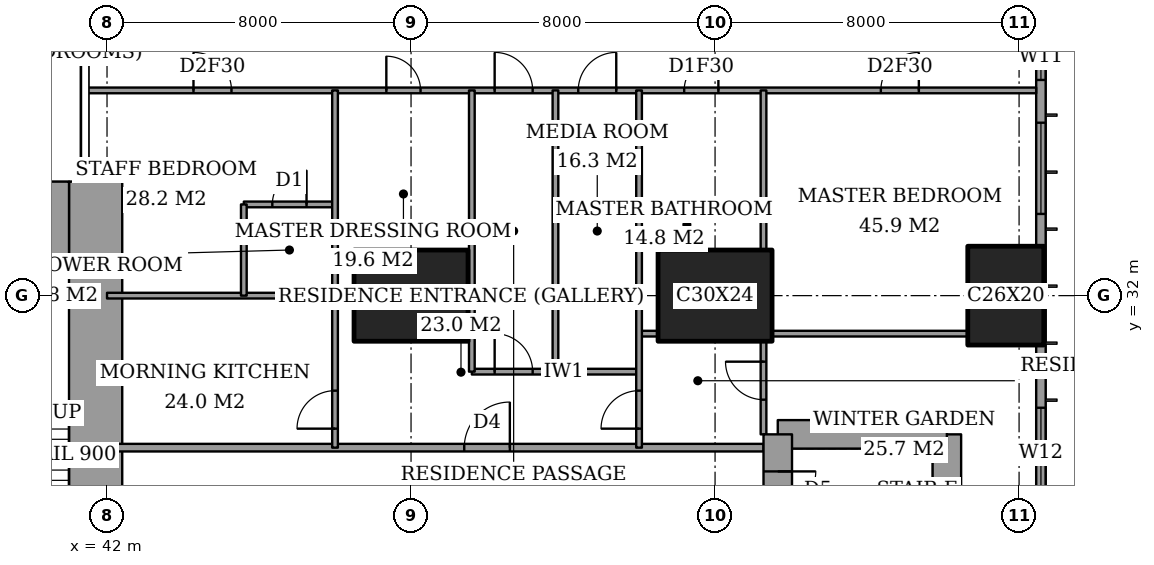
"""IFC4 building model, lengths in metres.
Left out: names, types, materials, properties, quantities, classifications, styles, units other than length and angle.
Written with IfcOpenShell. Run it as: python <this file> out.ifc"""

import sys

from ifc_helpers import new_model, si_unit, direction, frame, frame_2d, origin, origin_2d, place, context, subcontext, project, spatial, rectangle, extrude, element, fill, save


model = new_model("IFC4")
c1 = context("Model", 3, precision=1e-05, world=origin(), true_north=direction((0.0, 1.0)))
c2 = subcontext(c1, "Body", "Model", "MODEL_VIEW")
j1 = project(units=[si_unit("LENGTHUNIT", "METRE"), si_unit("PLANEANGLEUNIT", "RADIAN")], contexts=[c1])
p1 = place(None, origin())
s1 = spatial("IfcSite", under=j1, at=p1, CompositionType="ELEMENT")
p2 = place(p1, origin())
s2 = spatial("IfcBuilding", under=s1, at=p2, CompositionType="ELEMENT")
p3 = place(p2, frame((0.0, 0.0, 157.4)))
s3 = spatial("IfcBuildingStorey", under=s2, at=p3, CompositionType="ELEMENT", Elevation=157.4)
for number, where, z_axis, x_axis in (
    (1, (50.0, 32.0, 0.0), (0.0, 0.0, 1.0), (1.0, 0.0, 0.0)),
    (2, (58.0, 32.0, 0.0), (0.0, 0.0, 1.0), (1.0, 0.0, 0.0)),
):
    element("IfcColumn", number, at=place(p3, frame(where, z_axis=z_axis, x_axis=x_axis)), inside=s3, PredefinedType="COLUMN", context=c2, shape_type="SweptSolid", body=[
        extrude(rectangle(XDim=3.0, YDim=2.4, at=origin_2d()), origin(), (0.0, 0.0, 1.0), 3.6),
    ])
p4 = place(p3, frame((65.65, 32.0, 0.0), z_axis=(0.0, 0.0, 1.0), x_axis=(0.0, 1.0, 0.0)))
e3 = element("IfcColumn", 3, at=p4, inside=s3, PredefinedType="COLUMN", context=c2, shape_type="SweptSolid", body=[
    extrude(rectangle(XDim=2.6, YDim=2.0, at=origin_2d()), origin(), (0.0, 0.0, 1.0), 3.6),
])
p5 = place(p3, frame((37.85, 34.0, 0.0), z_axis=(0.0, 0.0, 1.0), x_axis=(1.0, 0.0, 0.0)))
e4 = element("IfcWall", 4, at=p5, inside=s3, PredefinedType="SHEAR", context=c2, shape_type="SweptSolid", body=[
    extrude(rectangle(XDim=3.15, YDim=2.0, at=frame_2d((1.575, 0.0))), origin(), (0.0, 0.0, 1.0), 3.6),
])
p6 = place(p3, frame((41.7, 24.85, 0.0), z_axis=(0.0, 0.0, 1.0), x_axis=(0.0, 1.0, 0.0)))
e5 = element("IfcWall", 5, at=p6, inside=s3, PredefinedType="SHEAR", context=c2, shape_type="SweptSolid", body=[
    extrude(rectangle(XDim=10.15, YDim=1.4, at=frame_2d((5.075, 0.0))), origin(), (0.0, 0.0, 1.0), 3.6),
])
p7 = place(p3, frame((64.1, 19.65, 0.0), z_axis=(0.0, 0.0, 1.0), x_axis=(0.0, 1.0, 0.0)))
e6 = element("IfcWall", 6, at=p7, inside=s3, PredefinedType="SHEAR", context=c2, shape_type="SweptSolid", body=[
    extrude(rectangle(XDim=8.7, YDim=0.75, at=frame_2d((4.35, 0.0))), origin(), (0.0, 0.0, 1.0), 3.6),
])
p8 = place(p3, frame((64.1, 28.35, 0.0), z_axis=(0.0, 0.0, 1.0), x_axis=(-1.0, 0.0, 0.0)))
e7 = element("IfcWall", 7, at=p8, inside=s3, PredefinedType="SHEAR", context=c2, shape_type="SweptSolid", body=[
    extrude(rectangle(XDim=4.45, YDim=0.75, at=frame_2d((2.225, 0.0))), origin(), (0.0, 0.0, 1.0), 3.6),
])
p9 = place(p3, frame((59.65, 28.35, 0.0), z_axis=(0.0, 0.0, 1.0), x_axis=(0.0, -1.0, 0.0)))
e8 = element("IfcWall", 8, at=p9, inside=s3, PredefinedType="SHEAR", context=c2, shape_type="SweptSolid", body=[
    extrude(rectangle(XDim=8.7, YDim=0.75, at=frame_2d((4.35, 0.0))), origin(), (0.0, 0.0, 1.0), 3.6),
])
p10 = place(p9, frame((0.975, 0.0, 0.0)))
e9 = element("IfcOpeningElement", 9, at=p10, cuts=e8, PredefinedType="OPENING", context=c2, shape_type="SweptSolid", body=[
    extrude(rectangle(XDim=1.0, YDim=2.1, at=frame_2d((0.5, 1.05))), frame((0.0, 0.385, 0.0), z_axis=(0.0, -1.0, 0.0), x_axis=(1.0, 0.0, 0.0)), (0.0, 0.0, 1.0), 0.77),
])
p11 = place(p3, frame((66.575, 3.175, 0.0), z_axis=(0.0, 0.0, 1.0), x_axis=(0.0, 1.0, 0.0)))
e10 = element("IfcWall", 10, at=p11, inside=s3, PredefinedType="SOLIDWALL", context=c2, shape_type="SweptSolid", body=[
    extrude(rectangle(XDim=41.65, YDim=0.25, at=frame_2d((20.825, 0.0))), origin(), (0.0, 0.0, 1.0), 3.6),
])
p12 = place(p11, frame((0.775, 0.0, 0.4)))
e11 = element("IfcOpeningElement", 11, at=p12, cuts=e10, PredefinedType="OPENING", context=c2, shape_type="SweptSolid", body=[
    extrude(rectangle(XDim=2.4, YDim=2.2, at=frame_2d((1.2, 1.1))), frame((0.0, 0.135, 0.0), z_axis=(0.0, -1.0, 0.0), x_axis=(1.0, 0.0, 0.0)), (0.0, 0.0, 1.0), 0.27),
])
p13 = place(p11, frame((6.225, 0.0, 0.4)))
e12 = element("IfcOpeningElement", 12, at=p13, cuts=e10, PredefinedType="OPENING", context=c2, shape_type="SweptSolid", body=[
    extrude(rectangle(XDim=1.2, YDim=2.2, at=frame_2d((0.6, 1.1))), frame((0.0, 0.135, 0.0), z_axis=(0.0, -1.0, 0.0), x_axis=(1.0, 0.0, 0.0)), (0.0, 0.0, 1.0), 0.27),
])
p14 = place(p11, frame((8.475, 0.0, 0.4)))
e13 = element("IfcOpeningElement", 13, at=p14, cuts=e10, PredefinedType="OPENING", context=c2, shape_type="SweptSolid", body=[
    extrude(rectangle(XDim=2.4, YDim=2.2, at=frame_2d((1.2, 1.1))), frame((0.0, 0.135, 0.0), z_axis=(0.0, -1.0, 0.0), x_axis=(1.0, 0.0, 0.0)), (0.0, 0.0, 1.0), 0.27),
])
p15 = place(p11, frame((15.775, 0.0, 0.4)))
e14 = element("IfcOpeningElement", 14, at=p15, cuts=e10, PredefinedType="OPENING", context=c2, shape_type="SweptSolid", body=[
    extrude(rectangle(XDim=2.4, YDim=2.2, at=frame_2d((1.2, 1.1))), frame((0.0, 0.135, 0.0), z_axis=(0.0, -1.0, 0.0), x_axis=(1.0, 0.0, 0.0)), (0.0, 0.0, 1.0), 0.27),
])
p16 = place(p11, frame((23.475, 0.0, 0.4)))
e15 = element("IfcOpeningElement", 15, at=p16, cuts=e10, PredefinedType="OPENING", context=c2, shape_type="SweptSolid", body=[
    extrude(rectangle(XDim=2.4, YDim=2.2, at=frame_2d((1.2, 1.1))), frame((0.0, 0.135, 0.0), z_axis=(0.0, -1.0, 0.0), x_axis=(1.0, 0.0, 0.0)), (0.0, 0.0, 1.0), 0.27),
])
p17 = place(p11, frame((30.975, 0.0, 0.4)))
e16 = element("IfcOpeningElement", 16, at=p17, cuts=e10, PredefinedType="OPENING", context=c2, shape_type="SweptSolid", body=[
    extrude(rectangle(XDim=2.4, YDim=2.2, at=frame_2d((1.2, 1.1))), frame((0.0, 0.135, 0.0), z_axis=(0.0, -1.0, 0.0), x_axis=(1.0, 0.0, 0.0)), (0.0, 0.0, 1.0), 0.27),
])
p18 = place(p11, frame((34.5, 0.0, 0.4)))
e17 = element("IfcOpeningElement", 17, at=p18, cuts=e10, PredefinedType="OPENING", context=c2, shape_type="SweptSolid", body=[
    extrude(rectangle(XDim=1.2, YDim=2.2, at=frame_2d((0.6, 1.1))), frame((0.0, 0.135, 0.0), z_axis=(0.0, -1.0, 0.0), x_axis=(1.0, 0.0, 0.0)), (0.0, 0.0, 1.0), 0.27),
])
p19 = place(p11, frame((38.475, 0.0, 0.4)))
e18 = element("IfcOpeningElement", 18, at=p19, cuts=e10, PredefinedType="OPENING", context=c2, shape_type="SweptSolid", body=[
    extrude(rectangle(XDim=2.4, YDim=2.2, at=frame_2d((1.2, 1.1))), frame((0.0, 0.135, 0.0), z_axis=(0.0, -1.0, 0.0), x_axis=(1.0, 0.0, 0.0)), (0.0, 0.0, 1.0), 0.27),
])
p20 = place(p3, frame((42.0, 28.0, 0.0), z_axis=(0.0, 0.0, 1.0), x_axis=(1.0, 0.0, 0.0)))
e19 = element("IfcWall", 19, at=p20, inside=s3, PredefinedType="PARTITIONING", context=c2, shape_type="SweptSolid", body=[
    extrude(rectangle(XDim=17.275, YDim=0.2, at=frame_2d((8.637, 0.0))), origin(), (0.0, 0.0, 1.0), 3.35),
])
p21 = place(p20, frame((9.4, 0.0, 0.0)))
e20 = element("IfcOpeningElement", 20, at=p21, cuts=e19, PredefinedType="OPENING", context=c2, shape_type="SweptSolid", body=[
    extrude(rectangle(XDim=1.2, YDim=2.4, at=frame_2d((0.6, 1.2))), frame((0.0, 0.11, 0.0), z_axis=(0.0, -1.0, 0.0), x_axis=(1.0, 0.0, 0.0)), (0.0, 0.0, 1.0), 0.22),
])
p22 = place(p3, frame((51.6, 30.0, 0.0), z_axis=(0.0, 0.0, 1.0), x_axis=(1.0, 0.0, 0.0)))
e21 = element("IfcWall", 21, at=p22, inside=s3, PredefinedType="PARTITIONING", context=c2, shape_type="SweptSolid", body=[
    extrude(rectangle(XDim=4.4, YDim=0.15, at=frame_2d((2.2, 0.0))), origin(), (0.0, 0.0, 1.0), 3.35),
])
p23 = place(p22, frame((0.6, 0.0, 0.0)))
e22 = element("IfcOpeningElement", 22, at=p23, cuts=e21, PredefinedType="OPENING", context=c2, shape_type="SweptSolid", body=[
    extrude(rectangle(XDim=1.0, YDim=2.1, at=frame_2d((0.5, 1.05))), frame((0.0, 0.085, 0.0), z_axis=(0.0, -1.0, 0.0), x_axis=(1.0, 0.0, 0.0)), (0.0, 0.0, 1.0), 0.17),
])
p24 = place(p3, frame((56.0, 31.0, 0.0), z_axis=(0.0, 0.0, 1.0), x_axis=(1.0, 0.0, 0.0)))
e23 = element("IfcWall", 23, at=p24, inside=s3, PredefinedType="PARTITIONING", context=c2, shape_type="SweptSolid", body=[
    extrude(rectangle(XDim=0.5, YDim=0.15, at=frame_2d((0.25, 0.0))), origin(), (0.0, 0.0, 1.0), 3.35),
])
p25 = place(p3, frame((59.5, 31.0, 0.0), z_axis=(0.0, 0.0, 1.0), x_axis=(1.0, 0.0, 0.0)))
e24 = element("IfcWall", 24, at=p25, inside=s3, PredefinedType="PARTITIONING", context=c2, shape_type="SweptSolid", body=[
    extrude(rectangle(XDim=5.15, YDim=0.15, at=frame_2d((2.575, 0.0))), origin(), (0.0, 0.0, 1.0), 3.35),
])
p26 = place(p3, frame((48.0, 31.95, 0.0), z_axis=(0.0, 0.0, 1.0), x_axis=(1.0, 0.0, 0.0)))
e25 = element("IfcWall", 25, at=p26, inside=s3, PredefinedType="PARTITIONING", context=c2, shape_type="SweptSolid", body=[
    extrude(rectangle(XDim=0.5, YDim=0.15, at=frame_2d((0.25, 0.0))), origin(), (0.0, 0.0, 1.0), 2.634),
])
p27 = place(p3, frame((42.0, 32.0, 0.0), z_axis=(0.0, 0.0, 1.0), x_axis=(1.0, 0.0, 0.0)))
e26 = element("IfcWall", 26, at=p27, inside=s3, PredefinedType="PARTITIONING", context=c2, shape_type="SweptSolid", body=[
    extrude(rectangle(XDim=6.0, YDim=0.15, at=frame_2d((3.0, 0.0))), origin(), (0.0, 0.0, 1.0), 2.634),
])
p28 = place(p3, frame((45.6, 34.4, 0.0), z_axis=(0.0, 0.0, 1.0), x_axis=(1.0, 0.0, 0.0)))
e27 = element("IfcWall", 27, at=p28, inside=s3, PredefinedType="PARTITIONING", context=c2, shape_type="SweptSolid", body=[
    extrude(rectangle(XDim=2.4, YDim=0.15, at=frame_2d((1.2, 0.0))), origin(), (0.0, 0.0, 1.0), 3.35),
])
p29 = place(p28, frame((0.75, 0.0, 0.0)))
e28 = element("IfcOpeningElement", 28, at=p29, cuts=e27, PredefinedType="OPENING", context=c2, shape_type="SweptSolid", body=[
    extrude(rectangle(XDim=0.9, YDim=2.1, at=frame_2d((0.45, 1.05))), frame((0.0, 0.085, 0.0), z_axis=(0.0, -1.0, 0.0), x_axis=(1.0, 0.0, 0.0)), (0.0, 0.0, 1.0), 0.17),
])
p30 = place(p3, frame((41.439, 37.4, 0.0), z_axis=(0.0, 0.0, 1.0), x_axis=(1.0, 0.0, 0.0)))
e29 = element("IfcWall", 29, at=p30, inside=s3, PredefinedType="PARTITIONING", context=c2, shape_type="SweptSolid", body=[
    extrude(rectangle(XDim=25.011, YDim=0.15, at=frame_2d((12.505, 0.0))), origin(), (0.0, 0.0, 1.0), 3.35),
])
p31 = place(p30, frame((10.761, 0.0, 0.0)))
e30 = element("IfcOpeningElement", 30, at=p31, cuts=e29, PredefinedType="OPENING", context=c2, shape_type="SweptSolid", body=[
    extrude(rectangle(XDim=1.0, YDim=2.1, at=frame_2d((0.5, 1.05))), frame((0.0, 0.085, 0.0), z_axis=(0.0, -1.0, 0.0), x_axis=(1.0, 0.0, 0.0)), (0.0, 0.0, 1.0), 0.17),
])
p32 = place(p30, frame((20.924, 0.0, 0.0)))
e31 = element("IfcOpeningElement", 31, at=p32, cuts=e29, PredefinedType="OPENING", context=c2, shape_type="SweptSolid", body=[
    extrude(rectangle(XDim=1.0, YDim=2.1, at=frame_2d((0.5, 1.05))), frame((0.0, 0.085, 0.0), z_axis=(0.0, -1.0, 0.0), x_axis=(1.0, 0.0, 0.0)), (0.0, 0.0, 1.0), 0.17),
])
p33 = place(p30, frame((15.749, 0.0, 0.0)))
e32 = element("IfcOpeningElement", 32, at=p33, cuts=e29, PredefinedType="OPENING", context=c2, shape_type="SweptSolid", body=[
    extrude(rectangle(XDim=0.9, YDim=2.1, at=frame_2d((0.45, 1.05))), frame((0.0, 0.085, 0.0), z_axis=(0.0, -1.0, 0.0), x_axis=(1.0, 0.0, 0.0)), (0.0, 0.0, 1.0), 0.17),
])
p34 = place(p30, frame((12.961, 0.0, 0.0)))
e33 = element("IfcOpeningElement", 33, at=p34, cuts=e29, PredefinedType="OPENING", context=c2, shape_type="SweptSolid", body=[
    extrude(rectangle(XDim=1.0, YDim=2.1, at=frame_2d((0.5, 1.05))), frame((0.0, 0.085, 0.0), z_axis=(0.0, -1.0, 0.0), x_axis=(1.0, 0.0, 0.0)), (0.0, 0.0, 1.0), 0.17),
])
p35 = place(p30, frame((7.911, 0.0, 0.0)))
e34 = element("IfcOpeningElement", 34, at=p35, cuts=e29, PredefinedType="OPENING", context=c2, shape_type="SweptSolid", body=[
    extrude(rectangle(XDim=0.9, YDim=2.1, at=frame_2d((0.45, 1.05))), frame((0.0, 0.085, 0.0), z_axis=(0.0, -1.0, 0.0), x_axis=(1.0, 0.0, 0.0)), (0.0, 0.0, 1.0), 0.17),
])
p36 = place(p30, frame((2.836, 0.0, 0.0)))
e35 = element("IfcOpeningElement", 35, at=p36, cuts=e29, PredefinedType="OPENING", context=c2, shape_type="SweptSolid", body=[
    extrude(rectangle(XDim=1.0, YDim=2.1, at=frame_2d((0.5, 1.05))), frame((0.0, 0.085, 0.0), z_axis=(0.0, -1.0, 0.0), x_axis=(1.0, 0.0, 0.0)), (0.0, 0.0, 1.0), 0.17),
])
p37 = place(p3, frame((45.6, 32.0, 0.0), z_axis=(0.0, 0.0, 1.0), x_axis=(0.0, 1.0, 0.0)))
e36 = element("IfcWall", 36, at=p37, inside=s3, PredefinedType="PARTITIONING", context=c2, shape_type="SweptSolid", body=[
    extrude(rectangle(XDim=2.4, YDim=0.15, at=frame_2d((1.2, 0.0))), origin(), (0.0, 0.0, 1.0), 3.35),
])
p38 = place(p3, frame((48.0, 28.0, 0.0), z_axis=(0.0, 0.0, 1.0), x_axis=(0.0, 1.0, 0.0)))
e37 = element("IfcWall", 37, at=p38, inside=s3, PredefinedType="PARTITIONING", context=c2, shape_type="SweptSolid", body=[
    extrude(rectangle(XDim=9.4, YDim=0.15, at=frame_2d((4.7, 0.0))), origin(), (0.0, 0.0, 1.0), 3.35),
])
p39 = place(p38, frame((0.5, 0.0, 0.0)))
e38 = element("IfcOpeningElement", 38, at=p39, cuts=e37, PredefinedType="OPENING", context=c2, shape_type="SweptSolid", body=[
    extrude(rectangle(XDim=1.0, YDim=2.1, at=frame_2d((0.5, 1.05))), frame((0.0, 0.085, 0.0), z_axis=(0.0, -1.0, 0.0), x_axis=(1.0, 0.0, 0.0)), (0.0, 0.0, 1.0), 0.17),
])
for number, where, z_axis, x_axis in (
    (39, (51.6, 30.0, 0.0), (0.0, 0.0, 1.0), (0.0, 1.0, 0.0)),
    (40, (53.8, 30.0, 0.0), (0.0, 0.0, 1.0), (0.0, 1.0, 0.0)),
):
    element("IfcWall", number, at=place(p3, frame(where, z_axis=z_axis, x_axis=x_axis)), inside=s3, PredefinedType="PARTITIONING", context=c2, shape_type="SweptSolid", body=[
        extrude(rectangle(XDim=7.4, YDim=0.15, at=frame_2d((3.7, 0.0))), origin(), (0.0, 0.0, 1.0), 3.35),
    ])
p40 = place(p3, frame((56.0, 28.0, 0.0), z_axis=(0.0, 0.0, 1.0), x_axis=(0.0, 1.0, 0.0)))
e41 = element("IfcWall", 41, at=p40, inside=s3, PredefinedType="PARTITIONING", context=c2, shape_type="SweptSolid", body=[
    extrude(rectangle(XDim=9.4, YDim=0.15, at=frame_2d((4.7, 0.0))), origin(), (0.0, 0.0, 1.0), 3.35),
])
p41 = place(p40, frame((0.5, 0.0, 0.0)))
e42 = element("IfcOpeningElement", 42, at=p41, cuts=e41, PredefinedType="OPENING", context=c2, shape_type="SweptSolid", body=[
    extrude(rectangle(XDim=1.0, YDim=2.1, at=frame_2d((0.5, 1.05))), frame((0.0, 0.085, 0.0), z_axis=(0.0, -1.0, 0.0), x_axis=(1.0, 0.0, 0.0)), (0.0, 0.0, 1.0), 0.17),
])
p42 = place(p3, frame((59.275, 28.35, 0.0), z_axis=(0.0, 0.0, 1.0), x_axis=(0.0, 1.0, 0.0)))
e43 = element("IfcWall", 43, at=p42, inside=s3, PredefinedType="PARTITIONING", context=c2, shape_type="SweptSolid", body=[
    extrude(rectangle(XDim=2.45, YDim=0.15, at=frame_2d((1.225, 0.0))), origin(), (0.0, 0.0, 1.0), 3.35),
])
p43 = place(p42, frame((0.913, 0.0, 0.0)))
e44 = element("IfcOpeningElement", 44, at=p43, cuts=e43, PredefinedType="OPENING", context=c2, shape_type="SweptSolid", body=[
    extrude(rectangle(XDim=1.0, YDim=2.1, at=frame_2d((0.5, 1.05))), frame((0.0, 0.085, 0.0), z_axis=(0.0, -1.0, 0.0), x_axis=(1.0, 0.0, 0.0)), (0.0, 0.0, 1.0), 0.17),
])
p44 = place(p3, frame((59.275, 33.2, 0.0), z_axis=(0.0, 0.0, 1.0), x_axis=(0.0, 1.0, 0.0)))
e45 = element("IfcWall", 45, at=p44, inside=s3, PredefinedType="PARTITIONING", context=c2, shape_type="SweptSolid", body=[
    extrude(rectangle(XDim=4.2, YDim=0.15, at=frame_2d((2.1, 0.0))), origin(), (0.0, 0.0, 1.0), 3.35),
])
p45 = place(p16, origin())
e46 = element("IfcWindow", 46, at=p45, inside=s3, PartitioningType="SINGLE_PANEL", PredefinedType="WINDOW", context=c2, shape_type="SweptSolid", body=[
    extrude(rectangle(XDim=2.4, YDim=2.2, at=frame_2d((1.2, 1.1))), frame((0.0, 0.03, 0.0), z_axis=(0.0, -1.0, 0.0), x_axis=(1.0, 0.0, 0.0)), (0.0, 0.0, 1.0), 0.06),
])
fill(e15, e46)
p46 = place(p17, origin())
e47 = element("IfcWindow", 47, at=p46, inside=s3, PartitioningType="SINGLE_PANEL", PredefinedType="WINDOW", context=c2, shape_type="SweptSolid", body=[
    extrude(rectangle(XDim=2.4, YDim=2.2, at=frame_2d((1.2, 1.1))), frame((0.0, 0.03, 0.0), z_axis=(0.0, -1.0, 0.0), x_axis=(1.0, 0.0, 0.0)), (0.0, 0.0, 1.0), 0.06),
])
fill(e16, e47)
p47 = place(p18, origin())
e48 = element("IfcWindow", 48, at=p47, inside=s3, PartitioningType="SINGLE_PANEL", PredefinedType="WINDOW", context=c2, shape_type="SweptSolid", body=[
    extrude(rectangle(XDim=1.2, YDim=2.2, at=frame_2d((0.6, 1.1))), frame((0.0, 0.03, 0.0), z_axis=(0.0, -1.0, 0.0), x_axis=(1.0, 0.0, 0.0)), (0.0, 0.0, 1.0), 0.06),
])
fill(e17, e48)
p48 = place(p31, origin())
e49 = element("IfcDoor", 49, at=p48, inside=s3, OperationType="SINGLE_SWING_RIGHT", PredefinedType="DOOR", context=c2, shape_type="SweptSolid", body=[
    extrude(rectangle(XDim=1.0, YDim=2.1, at=frame_2d((0.5, 1.05))), frame((0.0, 0.025, 0.0), z_axis=(0.0, -1.0, 0.0), x_axis=(1.0, 0.0, 0.0)), (0.0, 0.0, 1.0), 0.05),
])
fill(e30, e49)
p49 = place(p32, origin())
e50 = element("IfcDoor", 50, at=p49, inside=s3, OperationType="SINGLE_SWING_LEFT", PredefinedType="DOOR", context=c2, shape_type="SweptSolid", body=[
    extrude(rectangle(XDim=1.0, YDim=2.1, at=frame_2d((0.5, 1.05))), frame((0.0, 0.025, 0.0), z_axis=(0.0, -1.0, 0.0), x_axis=(1.0, 0.0, 0.0)), (0.0, 0.0, 1.0), 0.05),
])
fill(e31, e50)
p50 = place(p43, origin())
e51 = element("IfcDoor", 51, at=p50, inside=s3, OperationType="SINGLE_SWING_LEFT", PredefinedType="DOOR", context=c2, shape_type="SweptSolid", body=[
    extrude(rectangle(XDim=1.0, YDim=2.1, at=frame_2d((0.5, 1.05))), frame((0.0, 0.025, 0.0), z_axis=(0.0, -1.0, 0.0), x_axis=(1.0, 0.0, 0.0)), (0.0, 0.0, 1.0), 0.05),
])
fill(e44, e51)
p51 = place(p33, origin())
e52 = element("IfcDoor", 52, at=p51, inside=s3, OperationType="SINGLE_SWING_LEFT", PredefinedType="DOOR", context=c2, shape_type="SweptSolid", body=[
    extrude(rectangle(XDim=0.9, YDim=2.1, at=frame_2d((0.45, 1.05))), frame((0.0, 0.025, 0.0), z_axis=(0.0, -1.0, 0.0), x_axis=(1.0, 0.0, 0.0)), (0.0, 0.0, 1.0), 0.05),
])
fill(e32, e52)
p52 = place(p41, origin())
e53 = element("IfcDoor", 53, at=p52, inside=s3, OperationType="SINGLE_SWING_RIGHT", PredefinedType="DOOR", context=c2, shape_type="SweptSolid", body=[
    extrude(rectangle(XDim=1.0, YDim=2.1, at=frame_2d((0.5, 1.05))), frame((0.0, 0.025, 0.0), z_axis=(0.0, -1.0, 0.0), x_axis=(1.0, 0.0, 0.0)), (0.0, 0.0, 1.0), 0.05),
])
fill(e42, e53)
p53 = place(p21, origin())
e54 = element("IfcDoor", 54, at=p53, inside=s3, OperationType="SINGLE_SWING_LEFT", PredefinedType="DOOR", context=c2, shape_type="SweptSolid", body=[
    extrude(rectangle(XDim=1.2, YDim=2.4, at=frame_2d((0.6, 1.2))), frame((0.0, 0.025, 0.0), z_axis=(0.0, -1.0, 0.0), x_axis=(1.0, 0.0, 0.0)), (0.0, 0.0, 1.0), 0.05),
])
fill(e20, e54)
p54 = place(p34, origin())
e55 = element("IfcDoor", 55, at=p54, inside=s3, OperationType="SINGLE_SWING_LEFT", PredefinedType="DOOR", context=c2, shape_type="SweptSolid", body=[
    extrude(rectangle(XDim=1.0, YDim=2.1, at=frame_2d((0.5, 1.05))), frame((0.0, 0.025, 0.0), z_axis=(0.0, -1.0, 0.0), x_axis=(1.0, 0.0, 0.0)), (0.0, 0.0, 1.0), 0.05),
])
fill(e33, e55)
p55 = place(p23, origin())
e56 = element("IfcDoor", 56, at=p55, inside=s3, OperationType="SINGLE_SWING_RIGHT", PredefinedType="DOOR", context=c2, shape_type="SweptSolid", body=[
    extrude(rectangle(XDim=1.0, YDim=2.1, at=frame_2d((0.5, 1.05))), frame((0.0, 0.025, 0.0), z_axis=(0.0, -1.0, 0.0), x_axis=(1.0, 0.0, 0.0)), (0.0, 0.0, 1.0), 0.05),
])
fill(e22, e56)
p56 = place(p35, origin())
e57 = element("IfcDoor", 57, at=p56, inside=s3, OperationType="SINGLE_SWING_RIGHT", PredefinedType="DOOR", context=c2, shape_type="SweptSolid", body=[
    extrude(rectangle(XDim=0.9, YDim=2.1, at=frame_2d((0.45, 1.05))), frame((0.0, 0.025, 0.0), z_axis=(0.0, -1.0, 0.0), x_axis=(1.0, 0.0, 0.0)), (0.0, 0.0, 1.0), 0.05),
])
fill(e34, e57)
p57 = place(p29, origin())
e58 = element("IfcDoor", 58, at=p57, inside=s3, OperationType="SINGLE_SWING_LEFT", PredefinedType="DOOR", context=c2, shape_type="SweptSolid", body=[
    extrude(rectangle(XDim=0.9, YDim=2.1, at=frame_2d((0.45, 1.05))), frame((0.0, 0.025, 0.0), z_axis=(0.0, -1.0, 0.0), x_axis=(1.0, 0.0, 0.0)), (0.0, 0.0, 1.0), 0.05),
])
fill(e28, e58)
p58 = place(p36, origin())
e59 = element("IfcDoor", 59, at=p58, inside=s3, OperationType="SINGLE_SWING_RIGHT", PredefinedType="DOOR", context=c2, shape_type="SweptSolid", body=[
    extrude(rectangle(XDim=1.0, YDim=2.1, at=frame_2d((0.5, 1.05))), frame((0.0, 0.025, 0.0), z_axis=(0.0, -1.0, 0.0), x_axis=(1.0, 0.0, 0.0)), (0.0, 0.0, 1.0), 0.05),
])
fill(e35, e59)
p59 = place(p39, origin())
e60 = element("IfcDoor", 60, at=p59, inside=s3, OperationType="SINGLE_SWING_RIGHT", PredefinedType="DOOR", context=c2, shape_type="SweptSolid", body=[
    extrude(rectangle(XDim=1.0, YDim=2.1, at=frame_2d((0.5, 1.05))), frame((0.0, 0.025, 0.0), z_axis=(0.0, -1.0, 0.0), x_axis=(1.0, 0.0, 0.0)), (0.0, 0.0, 1.0), 0.05),
])
fill(e38, e60)
p60 = place(p10, origin())
e61 = element("IfcDoor", 61, at=p60, inside=s3, OperationType="SINGLE_SWING_RIGHT", PredefinedType="DOOR", context=c2, shape_type="SweptSolid", body=[
    extrude(rectangle(XDim=1.0, YDim=2.1, at=frame_2d((0.5, 1.05))), frame((0.0, 0.025, 0.0), z_axis=(0.0, -1.0, 0.0), x_axis=(1.0, 0.0, 0.0)), (0.0, 0.0, 1.0), 0.05),
])
fill(e9, e61)
save(model, sys.argv[1])
